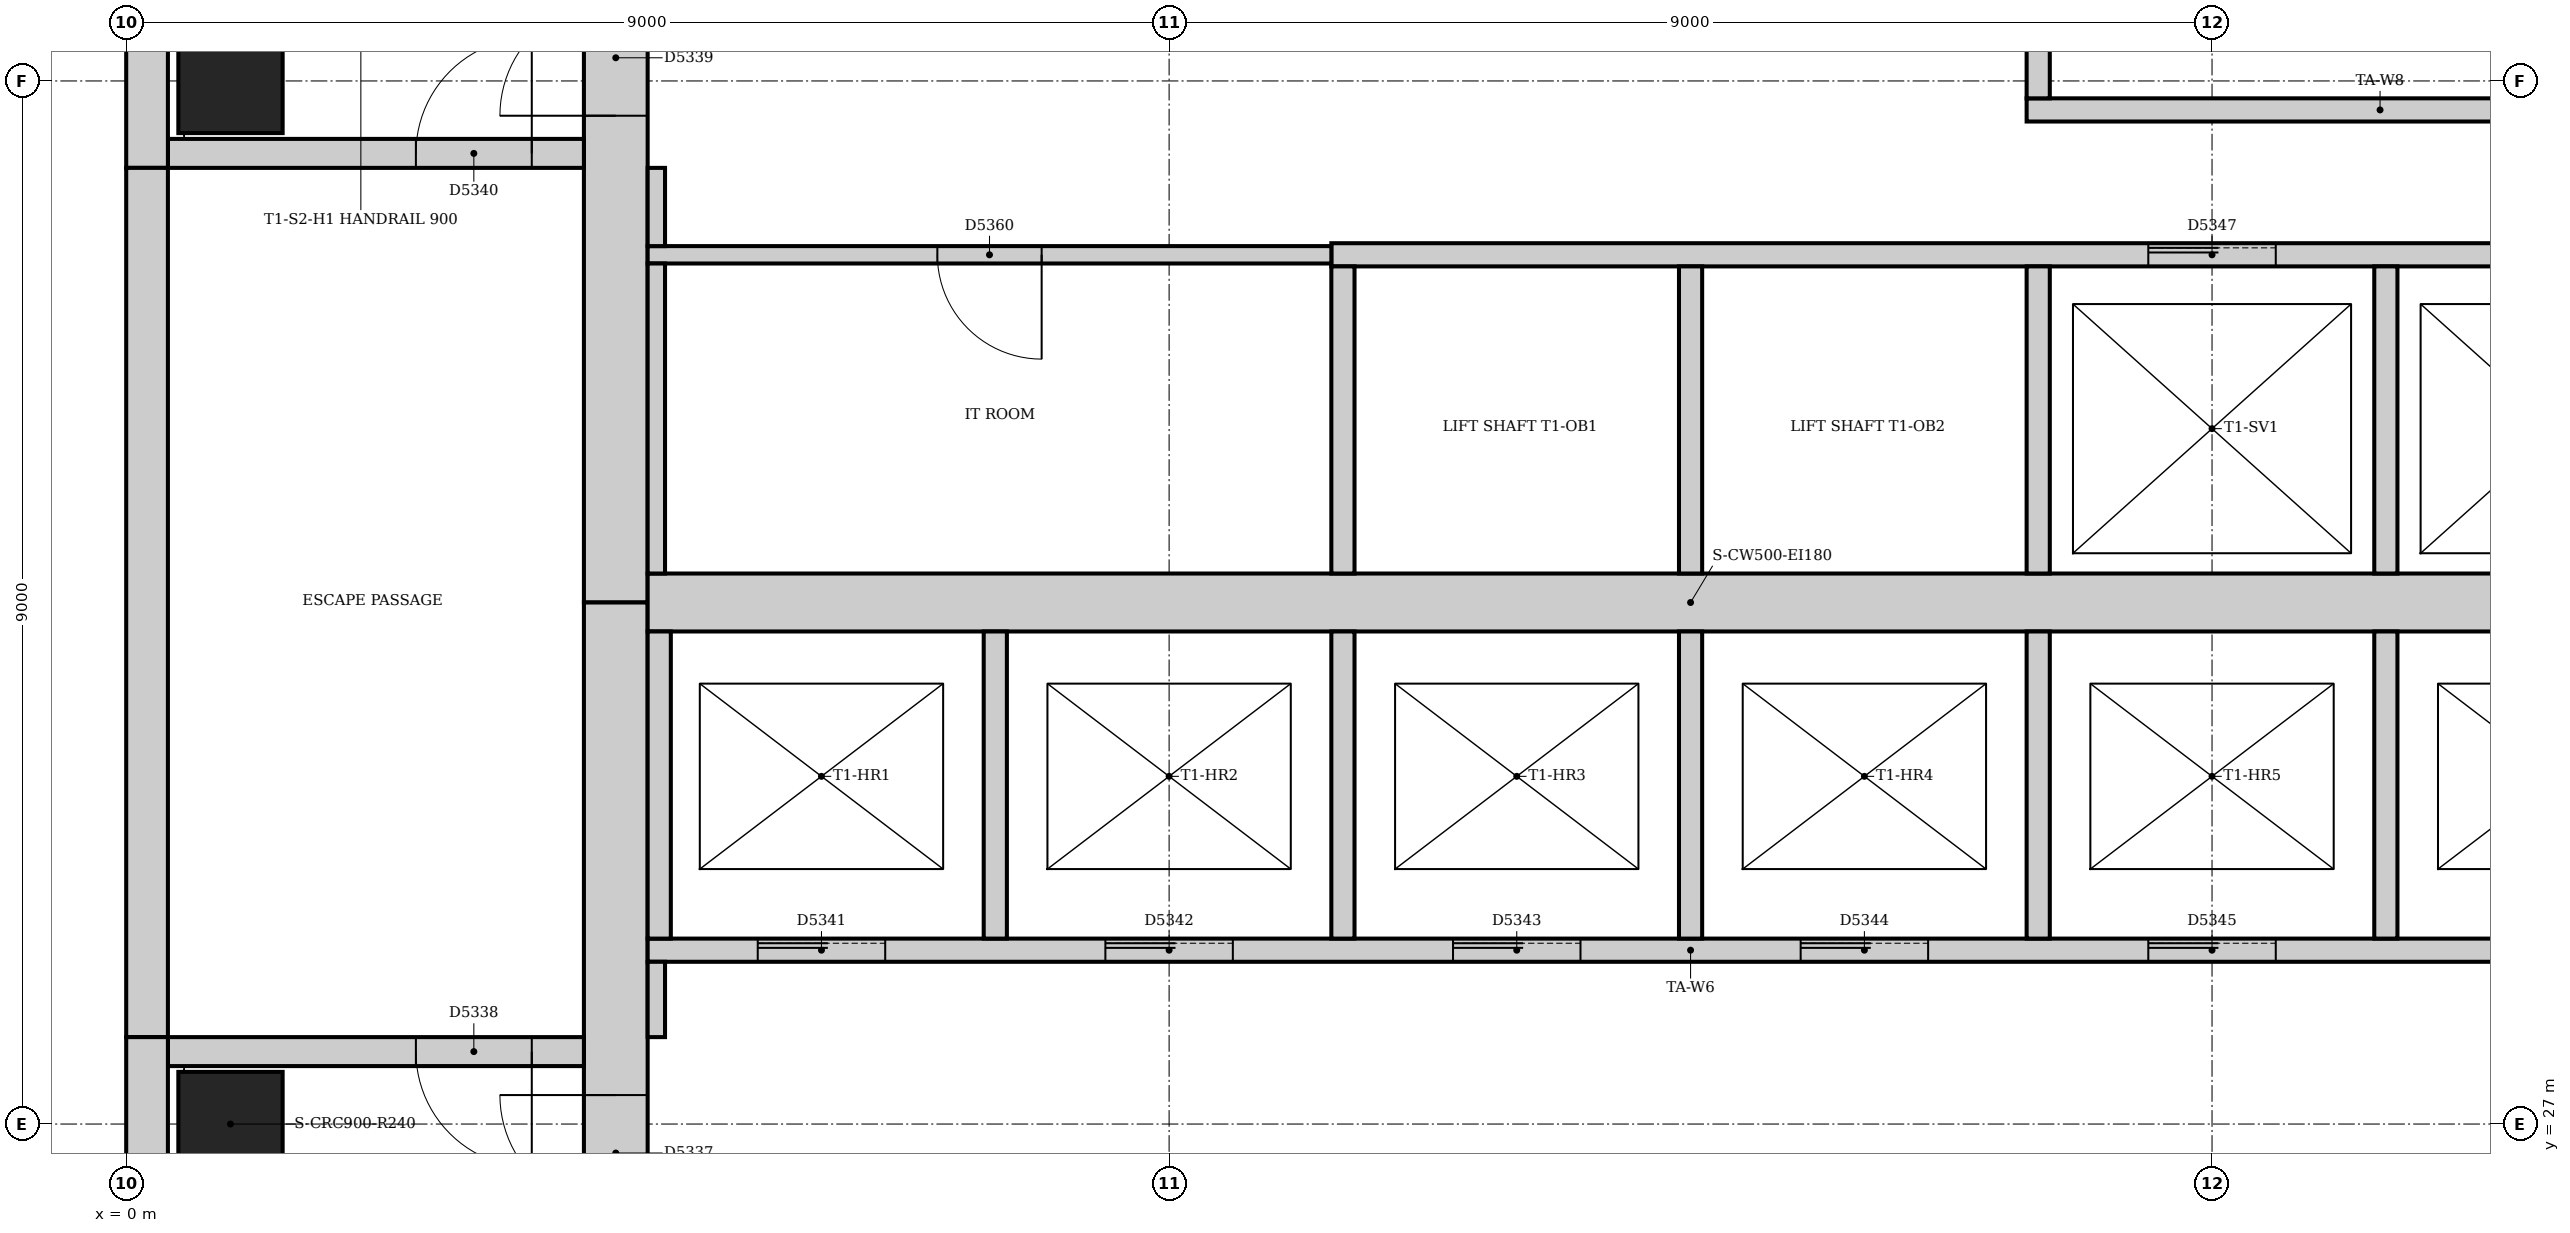
"""IFC4 building model, lengths in metres.
Left out: names, types, materials, properties, quantities, classifications, styles, units other than length and angle.
Written with IfcOpenShell. Run it as: python <this file> out.ifc"""

import sys

from ifc_helpers import new_model, si_unit, direction, frame, frame_2d, origin, origin_2d, place, context, subcontext, project, spatial, rectangle, extrude, element, fill, save


model = new_model("IFC4")
c1 = context("Model", 3, precision=1e-05, world=origin(), true_north=direction((0.0, 1.0)))
c2 = subcontext(c1, "Body", "Model", "MODEL_VIEW")
j1 = project(units=[si_unit("LENGTHUNIT", "METRE"), si_unit("PLANEANGLEUNIT", "RADIAN")], contexts=[c1])
p1 = place(None, origin())
s1 = spatial("IfcSite", under=j1, at=p1, CompositionType="ELEMENT")
p2 = place(p1, origin())
s2 = spatial("IfcBuilding", under=s1, at=p2, CompositionType="ELEMENT")
p3 = place(p2, frame((0.0, 0.0, 242.0)))
s3 = spatial("IfcBuildingStorey", under=s2, at=p3, CompositionType="ELEMENT", Elevation=242.0)
p4 = place(p3, frame((4.225, 42.0, 0.0), z_axis=(0.0, 0.0, 1.0), x_axis=(0.0, -1.0, 0.0)))
e1 = element("IfcWall", 1, at=p4, inside=s3, PredefinedType="SOLIDWALL", context=c2, shape_type="SweptSolid", body=[
    extrude(rectangle(XDim=10.5, YDim=0.55, at=frame_2d((5.25, 0.0))), origin(), (0.0, 0.0, 1.0), 5.0),
])
p5 = place(p4, frame((5.3, 0.0, 0.0)))
e2 = element("IfcOpeningElement", 2, at=p5, cuts=e1, PredefinedType="OPENING", context=c2, shape_type="SweptSolid", body=[
    extrude(rectangle(XDim=1.0, YDim=2.1, at=frame_2d((0.5, 1.05))), frame((0.0, 0.285, 0.0), z_axis=(0.0, -1.0, 0.0), x_axis=(1.0, 0.0, 0.0)), (0.0, 0.0, 1.0), 0.57),
])
p6 = place(p3, frame((4.225, 31.5, 0.0), z_axis=(0.0, 0.0, 1.0), x_axis=(0.0, -1.0, 0.0)))
e3 = element("IfcWall", 3, at=p6, inside=s3, PredefinedType="SOLIDWALL", context=c2, shape_type="SweptSolid", body=[
    extrude(rectangle(XDim=10.5, YDim=0.55, at=frame_2d((5.25, 0.0))), origin(), (0.0, 0.0, 1.0), 5.0),
])
p7 = place(p6, frame((4.25, 0.0, 0.0)))
e4 = element("IfcOpeningElement", 4, at=p7, cuts=e3, PredefinedType="OPENING", context=c2, shape_type="SweptSolid", body=[
    extrude(rectangle(XDim=1.0, YDim=2.1, at=frame_2d((0.5, 1.05))), frame((0.0, 0.285, 0.0), z_axis=(0.0, -1.0, 0.0), x_axis=(1.0, 0.0, 0.0)), (0.0, 0.0, 1.0), 0.57),
])
p8 = place(p3, frame((4.5, 31.5, 0.0), z_axis=(0.0, 0.0, 1.0), x_axis=(1.0, 0.0, 0.0)))
e5 = element("IfcWall", 5, at=p8, inside=s3, PredefinedType="SOLIDWALL", context=c2, shape_type="SweptSolid", body=[
    extrude(rectangle(XDim=18.0, YDim=0.5, at=frame_2d((9.0, 0.0))), origin(), (0.0, 0.0, 1.0), 5.0),
])
p9 = place(p3, frame((3.95, 27.625, 0.0), z_axis=(0.0, 0.0, 1.0), x_axis=(-1.0, 0.0, 0.0)))
e6 = element("IfcWall", 6, at=p9, inside=s3, PredefinedType="SOLIDWALL", context=c2, shape_type="SweptSolid", body=[
    extrude(rectangle(XDim=3.59, YDim=0.25, at=frame_2d((1.795, 0.0))), origin(), (0.0, 0.0, 1.0), 5.0),
])
p10 = place(p9, frame((0.45, 0.0, 0.0)))
e7 = element("IfcOpeningElement", 7, at=p10, cuts=e6, PredefinedType="OPENING", context=c2, shape_type="SweptSolid", body=[
    extrude(rectangle(XDim=1.0, YDim=2.1, at=frame_2d((0.5, 1.05))), frame((0.0, 0.135, 0.0), z_axis=(0.0, -1.0, 0.0), x_axis=(1.0, 0.0, 0.0)), (0.0, 0.0, 1.0), 0.27),
])
p11 = place(p3, frame((0.36, 35.375, 0.0), z_axis=(0.0, 0.0, 1.0), x_axis=(1.0, 0.0, 0.0)))
e8 = element("IfcWall", 8, at=p11, inside=s3, PredefinedType="SOLIDWALL", context=c2, shape_type="SweptSolid", body=[
    extrude(rectangle(XDim=3.59, YDim=0.25, at=frame_2d((1.795, 0.0))), origin(), (0.0, 0.0, 1.0), 5.0),
])
p12 = place(p11, frame((2.14, 0.0, 0.0)))
e9 = element("IfcOpeningElement", 9, at=p12, cuts=e8, PredefinedType="OPENING", context=c2, shape_type="SweptSolid", body=[
    extrude(rectangle(XDim=1.0, YDim=2.1, at=frame_2d((0.5, 1.05))), frame((0.0, 0.135, 0.0), z_axis=(0.0, -1.0, 0.0), x_axis=(1.0, 0.0, 0.0)), (0.0, 0.0, 1.0), 0.27),
])
for number, where, z_axis, x_axis in (
    (10, (0.9, 27.0, 0.0), (0.0, 0.0, 1.0), (1.0, 0.0, 0.0)),
    (11, (0.9, 36.0, 0.0), (0.0, 0.0, 1.0), (1.0, 0.0, 0.0)),
):
    element("IfcColumn", number, at=place(p3, frame(where, z_axis=z_axis, x_axis=x_axis)), inside=s3, PredefinedType="COLUMN", context=c2, shape_type="SweptSolid", body=[
        extrude(rectangle(XDim=0.9, YDim=0.9, at=origin_2d()), origin(), (0.0, 0.0, 1.0), 5.0),
    ])
p13 = place(p3, frame((0.18, 42.0, 0.0), z_axis=(0.0, 0.0, 1.0), x_axis=(0.0, -1.0, 0.0)))
e12 = element("IfcWall", 12, at=p13, inside=s3, PredefinedType="STANDARD", context=c2, shape_type="SweptSolid", body=[
    extrude(rectangle(XDim=6.75, YDim=0.36, at=frame_2d((3.375, 0.0))), origin(), (0.0, 0.0, 1.0), 4.85),
])
p14 = place(p3, frame((0.18, 35.25, 0.0), z_axis=(0.0, 0.0, 1.0), x_axis=(0.0, -1.0, 0.0)))
e13 = element("IfcWall", 13, at=p14, inside=s3, PredefinedType="STANDARD", context=c2, shape_type="SweptSolid", body=[
    extrude(rectangle(XDim=7.5, YDim=0.36, at=frame_2d((3.75, 0.0))), origin(), (0.0, 0.0, 1.0), 4.85),
])
p15 = place(p3, frame((0.18, 27.75, 0.0), z_axis=(0.0, 0.0, 1.0), x_axis=(0.0, -1.0, 0.0)))
e14 = element("IfcWall", 14, at=p15, inside=s3, PredefinedType="STANDARD", context=c2, shape_type="SweptSolid", body=[
    extrude(rectangle(XDim=6.75, YDim=0.36, at=frame_2d((3.375, 0.0))), origin(), (0.0, 0.0, 1.0), 4.85),
])
p16 = place(p3, frame((16.4, 35.75, 0.0), z_axis=(0.0, 0.0, 1.0), x_axis=(1.0, 0.0, 0.0)))
e15 = element("IfcWall", 15, at=p16, inside=s3, PredefinedType="PARTITIONING", context=c2, shape_type="SweptSolid", body=[
    extrude(rectangle(XDim=6.1, YDim=0.2, at=frame_2d((3.05, 0.0))), origin(), (0.0, 0.0, 1.0), 4.85),
])
p17 = place(p3, frame((16.5, 35.85, 0.0), z_axis=(0.0, 0.0, 1.0), x_axis=(0.0, 1.0, 0.0)))
e16 = element("IfcWall", 16, at=p17, inside=s3, PredefinedType="PARTITIONING", context=c2, shape_type="SweptSolid", body=[
    extrude(rectangle(XDim=2.55, YDim=0.2, at=frame_2d((1.275, 0.0))), origin(), (0.0, 0.0, 1.0), 4.85),
])
p18 = place(p3, frame((4.5, 28.5, 0.0), z_axis=(0.0, 0.0, 1.0), x_axis=(1.0, 0.0, 0.0)))
e17 = element("IfcWall", 17, at=p18, inside=s3, PredefinedType="PARTITIONING", context=c2, shape_type="SweptSolid", body=[
    extrude(rectangle(XDim=18.0, YDim=0.2, at=frame_2d((9.0, 0.0))), origin(), (0.0, 0.0, 1.0), 4.85),
])
p19 = place(p18, frame((0.95, 0.0, 0.0)))
e18 = element("IfcOpeningElement", 18, at=p19, cuts=e17, PredefinedType="OPENING", context=c2, shape_type="SweptSolid", body=[
    extrude(rectangle(XDim=1.1, YDim=2.1, at=frame_2d((0.55, 1.05))), frame((0.0, 0.11, 0.0), z_axis=(0.0, -1.0, 0.0), x_axis=(1.0, 0.0, 0.0)), (0.0, 0.0, 1.0), 0.22),
])
p20 = place(p18, frame((3.95, 0.0, 0.0)))
e19 = element("IfcOpeningElement", 19, at=p20, cuts=e17, PredefinedType="OPENING", context=c2, shape_type="SweptSolid", body=[
    extrude(rectangle(XDim=1.1, YDim=2.1, at=frame_2d((0.55, 1.05))), frame((0.0, 0.11, 0.0), z_axis=(0.0, -1.0, 0.0), x_axis=(1.0, 0.0, 0.0)), (0.0, 0.0, 1.0), 0.22),
])
p21 = place(p18, frame((6.95, 0.0, 0.0)))
e20 = element("IfcOpeningElement", 20, at=p21, cuts=e17, PredefinedType="OPENING", context=c2, shape_type="SweptSolid", body=[
    extrude(rectangle(XDim=1.1, YDim=2.1, at=frame_2d((0.55, 1.05))), frame((0.0, 0.11, 0.0), z_axis=(0.0, -1.0, 0.0), x_axis=(1.0, 0.0, 0.0)), (0.0, 0.0, 1.0), 0.22),
])
p22 = place(p18, frame((9.95, 0.0, 0.0)))
e21 = element("IfcOpeningElement", 21, at=p22, cuts=e17, PredefinedType="OPENING", context=c2, shape_type="SweptSolid", body=[
    extrude(rectangle(XDim=1.1, YDim=2.1, at=frame_2d((0.55, 1.05))), frame((0.0, 0.11, 0.0), z_axis=(0.0, -1.0, 0.0), x_axis=(1.0, 0.0, 0.0)), (0.0, 0.0, 1.0), 0.22),
])
p23 = place(p18, frame((12.95, 0.0, 0.0)))
e22 = element("IfcOpeningElement", 22, at=p23, cuts=e17, PredefinedType="OPENING", context=c2, shape_type="SweptSolid", body=[
    extrude(rectangle(XDim=1.1, YDim=2.1, at=frame_2d((0.55, 1.05))), frame((0.0, 0.11, 0.0), z_axis=(0.0, -1.0, 0.0), x_axis=(1.0, 0.0, 0.0)), (0.0, 0.0, 1.0), 0.22),
])
p24 = place(p18, frame((15.95, 0.0, 0.0)))
e23 = element("IfcOpeningElement", 23, at=p24, cuts=e17, PredefinedType="OPENING", context=c2, shape_type="SweptSolid", body=[
    extrude(rectangle(XDim=1.1, YDim=2.1, at=frame_2d((0.55, 1.05))), frame((0.0, 0.11, 0.0), z_axis=(0.0, -1.0, 0.0), x_axis=(1.0, 0.0, 0.0)), (0.0, 0.0, 1.0), 0.22),
])
p25 = place(p3, frame((10.4, 34.5, 0.0), z_axis=(0.0, 0.0, 1.0), x_axis=(1.0, 0.0, 0.0)))
e24 = element("IfcWall", 24, at=p25, inside=s3, PredefinedType="PARTITIONING", context=c2, shape_type="SweptSolid", body=[
    extrude(rectangle(XDim=12.1, YDim=0.2, at=frame_2d((6.05, 0.0))), origin(), (0.0, 0.0, 1.0), 4.85),
])
p26 = place(p25, frame((7.05, 0.0, 0.0)))
e25 = element("IfcOpeningElement", 25, at=p26, cuts=e24, PredefinedType="OPENING", context=c2, shape_type="SweptSolid", body=[
    extrude(rectangle(XDim=1.1, YDim=2.1, at=frame_2d((0.55, 1.05))), frame((0.0, 0.11, 0.0), z_axis=(0.0, -1.0, 0.0), x_axis=(1.0, 0.0, 0.0)), (0.0, 0.0, 1.0), 0.22),
])
p27 = place(p25, frame((10.05, 0.0, 0.0)))
e26 = element("IfcOpeningElement", 26, at=p27, cuts=e24, PredefinedType="OPENING", context=c2, shape_type="SweptSolid", body=[
    extrude(rectangle(XDim=1.1, YDim=2.1, at=frame_2d((0.55, 1.05))), frame((0.0, 0.11, 0.0), z_axis=(0.0, -1.0, 0.0), x_axis=(1.0, 0.0, 0.0)), (0.0, 0.0, 1.0), 0.22),
])
for number, where, z_axis, x_axis in (
    (27, (10.5, 28.6, 0.0), (0.0, 0.0, 1.0), (0.0, 1.0, 0.0)),
    (28, (10.5, 31.75, 0.0), (0.0, 0.0, 1.0), (0.0, 1.0, 0.0)),
    (29, (13.5, 28.6, 0.0), (0.0, 0.0, 1.0), (0.0, 1.0, 0.0)),
    (30, (13.5, 31.75, 0.0), (0.0, 0.0, 1.0), (0.0, 1.0, 0.0)),
    (31, (16.5, 28.6, 0.0), (0.0, 0.0, 1.0), (0.0, 1.0, 0.0)),
    (32, (16.5, 31.75, 0.0), (0.0, 0.0, 1.0), (0.0, 1.0, 0.0)),
    (33, (19.5, 28.6, 0.0), (0.0, 0.0, 1.0), (0.0, 1.0, 0.0)),
    (34, (19.5, 31.75, 0.0), (0.0, 0.0, 1.0), (0.0, 1.0, 0.0)),
    (35, (4.6, 28.6, 0.0), (0.0, 0.0, 1.0), (0.0, 1.0, 0.0)),
    (36, (7.5, 28.6, 0.0), (0.0, 0.0, 1.0), (0.0, 1.0, 0.0)),
):
    element("IfcWall", number, at=place(p3, frame(where, z_axis=z_axis, x_axis=x_axis)), inside=s3, PredefinedType="PARTITIONING", context=c2, shape_type="SweptSolid", body=[
        extrude(rectangle(XDim=2.65, YDim=0.2, at=frame_2d((1.325, 0.0))), origin(), (0.0, 0.0, 1.0), 4.85),
    ])
p28 = place(p3, frame((4.5, 34.5, 0.0), z_axis=(0.0, 0.0, 1.0), x_axis=(1.0, 0.0, 0.0)))
e37 = element("IfcWall", 37, at=p28, inside=s3, PredefinedType="PARTITIONING", context=c2, shape_type="SweptSolid", body=[
    extrude(rectangle(XDim=5.9, YDim=0.15, at=frame_2d((2.95, 0.0))), origin(), (0.0, 0.0, 1.0), 4.85),
])
p29 = place(p28, frame((2.5, 0.0, 0.0)))
e38 = element("IfcOpeningElement", 38, at=p29, cuts=e37, PredefinedType="OPENING", context=c2, shape_type="SweptSolid", body=[
    extrude(rectangle(XDim=0.9, YDim=2.1, at=frame_2d((0.45, 1.05))), frame((0.0, 0.085, 0.0), z_axis=(0.0, -1.0, 0.0), x_axis=(1.0, 0.0, 0.0)), (0.0, 0.0, 1.0), 0.17),
])
p30 = place(p3, frame((4.575, 34.575, 0.0), z_axis=(0.0, 0.0, 1.0), x_axis=(0.0, 1.0, 0.0)))
e39 = element("IfcWall", 39, at=p30, inside=s3, PredefinedType="PARTITIONING", context=c2, shape_type="SweptSolid", body=[
    extrude(rectangle(XDim=0.675, YDim=0.15, at=frame_2d((0.338, 0.0))), origin(), (0.0, 0.0, 1.0), 4.85),
])
p31 = place(p3, frame((4.575, 31.75, 0.0), z_axis=(0.0, 0.0, 1.0), x_axis=(0.0, 1.0, 0.0)))
e40 = element("IfcWall", 40, at=p31, inside=s3, PredefinedType="PARTITIONING", context=c2, shape_type="SweptSolid", body=[
    extrude(rectangle(XDim=2.675, YDim=0.15, at=frame_2d((1.337, 0.0))), origin(), (0.0, 0.0, 1.0), 4.85),
])
p32 = place(p3, frame((4.575, 27.75, 0.0), z_axis=(0.0, 0.0, 1.0), x_axis=(0.0, 1.0, 0.0)))
e41 = element("IfcWall", 41, at=p32, inside=s3, PredefinedType="PARTITIONING", context=c2, shape_type="SweptSolid", body=[
    extrude(rectangle(XDim=0.65, YDim=0.15, at=frame_2d((0.325, 0.0))), origin(), (0.0, 0.0, 1.0), 4.85),
])
p33 = place(p7, frame((1.0, 0.0, 0.0), z_axis=(0.0, 0.0, 1.0), x_axis=(-1.0, 0.0, 0.0)))
e42 = element("IfcDoor", 42, at=p33, inside=s3, OperationType="SINGLE_SWING_RIGHT", PredefinedType="DOOR", context=c2, shape_type="SweptSolid", body=[
    extrude(rectangle(XDim=1.0, YDim=2.1, at=frame_2d((0.5, 1.05))), frame((0.0, 0.025, 0.0), z_axis=(0.0, -1.0, 0.0), x_axis=(1.0, 0.0, 0.0)), (0.0, 0.0, 1.0), 0.05),
])
fill(e4, e42)
p34 = place(p10, origin())
e43 = element("IfcDoor", 43, at=p34, inside=s3, OperationType="SINGLE_SWING_LEFT", PredefinedType="DOOR", context=c2, shape_type="SweptSolid", body=[
    extrude(rectangle(XDim=1.0, YDim=2.1, at=frame_2d((0.5, 1.05))), frame((0.0, 0.025, 0.0), z_axis=(0.0, -1.0, 0.0), x_axis=(1.0, 0.0, 0.0)), (0.0, 0.0, 1.0), 0.05),
])
fill(e7, e43)
p35 = place(p5, frame((1.0, 0.0, 0.0), z_axis=(0.0, 0.0, 1.0), x_axis=(-1.0, 0.0, 0.0)))
e44 = element("IfcDoor", 44, at=p35, inside=s3, OperationType="SINGLE_SWING_LEFT", PredefinedType="DOOR", context=c2, shape_type="SweptSolid", body=[
    extrude(rectangle(XDim=1.0, YDim=2.1, at=frame_2d((0.5, 1.05))), frame((0.0, 0.025, 0.0), z_axis=(0.0, -1.0, 0.0), x_axis=(1.0, 0.0, 0.0)), (0.0, 0.0, 1.0), 0.05),
])
fill(e2, e44)
p36 = place(p12, origin())
e45 = element("IfcDoor", 45, at=p36, inside=s3, OperationType="SINGLE_SWING_RIGHT", PredefinedType="DOOR", context=c2, shape_type="SweptSolid", body=[
    extrude(rectangle(XDim=1.0, YDim=2.1, at=frame_2d((0.5, 1.05))), frame((0.0, 0.025, 0.0), z_axis=(0.0, -1.0, 0.0), x_axis=(1.0, 0.0, 0.0)), (0.0, 0.0, 1.0), 0.05),
])
fill(e9, e45)
p37 = place(p19, origin())
e46 = element("IfcDoor", 46, at=p37, inside=s3, OperationType="SLIDING_TO_LEFT", PredefinedType="DOOR", context=c2, shape_type="SweptSolid", body=[
    extrude(rectangle(XDim=1.1, YDim=2.1, at=frame_2d((0.55, 1.05))), frame((0.0, 0.025, 0.0), z_axis=(0.0, -1.0, 0.0), x_axis=(1.0, 0.0, 0.0)), (0.0, 0.0, 1.0), 0.05),
])
fill(e18, e46)
p38 = place(p20, origin())
e47 = element("IfcDoor", 47, at=p38, inside=s3, OperationType="SLIDING_TO_LEFT", PredefinedType="DOOR", context=c2, shape_type="SweptSolid", body=[
    extrude(rectangle(XDim=1.1, YDim=2.1, at=frame_2d((0.55, 1.05))), frame((0.0, 0.025, 0.0), z_axis=(0.0, -1.0, 0.0), x_axis=(1.0, 0.0, 0.0)), (0.0, 0.0, 1.0), 0.05),
])
fill(e19, e47)
p39 = place(p21, origin())
e48 = element("IfcDoor", 48, at=p39, inside=s3, OperationType="SLIDING_TO_LEFT", PredefinedType="DOOR", context=c2, shape_type="SweptSolid", body=[
    extrude(rectangle(XDim=1.1, YDim=2.1, at=frame_2d((0.55, 1.05))), frame((0.0, 0.025, 0.0), z_axis=(0.0, -1.0, 0.0), x_axis=(1.0, 0.0, 0.0)), (0.0, 0.0, 1.0), 0.05),
])
fill(e20, e48)
p40 = place(p22, origin())
e49 = element("IfcDoor", 49, at=p40, inside=s3, OperationType="SLIDING_TO_LEFT", PredefinedType="DOOR", context=c2, shape_type="SweptSolid", body=[
    extrude(rectangle(XDim=1.1, YDim=2.1, at=frame_2d((0.55, 1.05))), frame((0.0, 0.025, 0.0), z_axis=(0.0, -1.0, 0.0), x_axis=(1.0, 0.0, 0.0)), (0.0, 0.0, 1.0), 0.05),
])
fill(e21, e49)
p41 = place(p23, origin())
e50 = element("IfcDoor", 50, at=p41, inside=s3, OperationType="SLIDING_TO_LEFT", PredefinedType="DOOR", context=c2, shape_type="SweptSolid", body=[
    extrude(rectangle(XDim=1.1, YDim=2.1, at=frame_2d((0.55, 1.05))), frame((0.0, 0.025, 0.0), z_axis=(0.0, -1.0, 0.0), x_axis=(1.0, 0.0, 0.0)), (0.0, 0.0, 1.0), 0.05),
])
fill(e22, e50)
p42 = place(p26, origin())
e51 = element("IfcDoor", 51, at=p42, inside=s3, OperationType="SLIDING_TO_LEFT", PredefinedType="DOOR", context=c2, shape_type="SweptSolid", body=[
    extrude(rectangle(XDim=1.1, YDim=2.1, at=frame_2d((0.55, 1.05))), frame((0.0, 0.025, 0.0), z_axis=(0.0, -1.0, 0.0), x_axis=(1.0, 0.0, 0.0)), (0.0, 0.0, 1.0), 0.05),
])
fill(e25, e51)
p43 = place(p29, frame((0.9, 0.0, 0.0), z_axis=(0.0, 0.0, 1.0), x_axis=(-1.0, 0.0, 0.0)))
e52 = element("IfcDoor", 52, at=p43, inside=s3, OperationType="SINGLE_SWING_LEFT", PredefinedType="DOOR", context=c2, shape_type="SweptSolid", body=[
    extrude(rectangle(XDim=0.9, YDim=2.1, at=frame_2d((0.45, 1.05))), frame((0.0, 0.025, 0.0), z_axis=(0.0, -1.0, 0.0), x_axis=(1.0, 0.0, 0.0)), (0.0, 0.0, 1.0), 0.05),
])
fill(e38, e52)
save(model, sys.argv[1])
